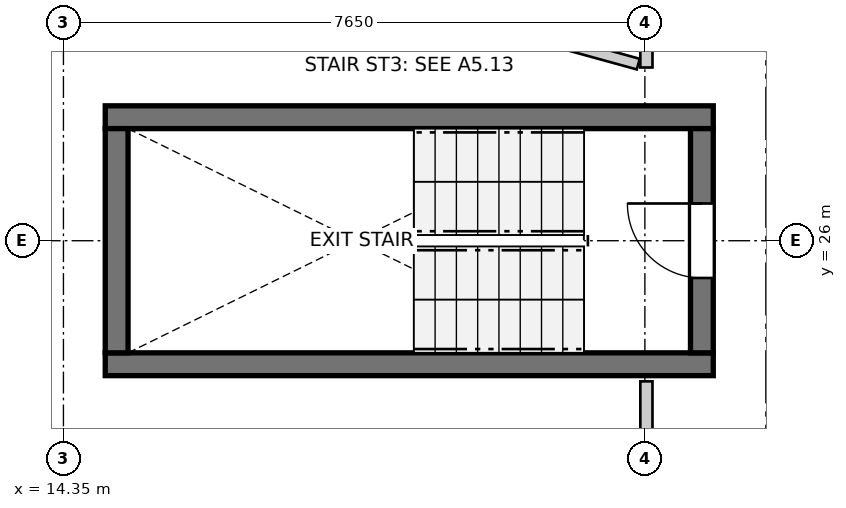
"""IFC4 building model, lengths in metres.
Left out: names, types, materials, properties, quantities, classifications, styles, units other than length and angle.
Written with IfcOpenShell. Run it as: python <this file> out.ifc"""

import sys

from ifc_helpers import new_model, si_unit, direction, frame, frame_2d, origin, place, context, subcontext, project, spatial, rectangle, extrude, source, transform, mapped, element, fill, save


model = new_model("IFC4")
c1 = context("Model", 3, precision=1e-05, world=origin(), true_north=direction((0.0, 1.0)))
c2 = subcontext(c1, "Body", "Model", "MODEL_VIEW")
j1 = project(units=[si_unit("LENGTHUNIT", "METRE"), si_unit("PLANEANGLEUNIT", "RADIAN")], contexts=[c1])
p1 = place(None, origin())
s1 = spatial("IfcSite", under=j1, at=p1, CompositionType="ELEMENT")
p2 = place(p1, origin())
s2 = spatial("IfcBuilding", under=s1, at=p2, CompositionType="ELEMENT")
p3 = place(p2, frame((0.0, 0.0, 46.2)))
s3 = spatial("IfcBuildingStorey", under=s2, at=p3, CompositionType="ELEMENT", Elevation=46.2)
for number, where, z_axis, x_axis in (
    (1, (14.9, 24.375, 0.0), (0.0, 0.0, 1.0), (1.0, 0.0, 0.0)),
    (2, (22.9, 27.625, 0.0), (0.0, 0.0, 1.0), (-1.0, 0.0, 0.0)),
):
    element("IfcWall", number, at=place(p3, frame(where, z_axis=z_axis, x_axis=x_axis)), inside=s3, PredefinedType="SHEAR", context=c2, shape_type="SweptSolid", body=[
        extrude(rectangle(XDim=8.0, YDim=0.3, at=frame_2d((4.0, 0.0))), origin(), (0.0, 0.0, 1.0), 2.94),
    ])
p4 = place(p3, frame((15.05, 27.475, 0.0), z_axis=(0.0, 0.0, 1.0), x_axis=(0.0, -1.0, 0.0)))
e3 = element("IfcWall", 3, at=p4, inside=s3, PredefinedType="SHEAR", context=c2, shape_type="SweptSolid", body=[
    extrude(rectangle(XDim=2.95, YDim=0.3, at=frame_2d((1.475, 0.0))), origin(), (0.0, 0.0, 1.0), 2.94),
])
p5 = place(p3, frame((22.75, 24.525, 0.0), z_axis=(0.0, 0.0, 1.0), x_axis=(0.0, 1.0, 0.0)))
e4 = element("IfcWall", 4, at=p5, inside=s3, PredefinedType="SHEAR", context=c2, shape_type="SweptSolid", body=[
    extrude(rectangle(XDim=2.95, YDim=0.3, at=frame_2d((1.475, 0.0))), origin(), (0.0, 0.0, 1.0), 2.94),
])
p6 = place(p5, frame((0.985, 0.0, 0.0)))
e5 = element("IfcOpeningElement", 5, at=p6, cuts=e4, PredefinedType="OPENING", context=c2, shape_type="SweptSolid", body=[
    extrude(rectangle(XDim=0.98, YDim=2.15, at=frame_2d((0.49, 1.075))), frame((0.0, 0.16, 0.0), z_axis=(0.0, -1.0, 0.0), x_axis=(1.0, 0.0, 0.0)), (0.0, 0.0, 1.0), 0.32),
])
p7 = place(p3, frame((22.02, 28.279, 0.0), z_axis=(0.0, 0.0, 1.0), x_axis=(0.0, 1.0, 0.0)))
e6 = element("IfcWall", 6, at=p7, inside=s3, PredefinedType="PARTITIONING", context=c2, shape_type="SweptSolid", body=[
    extrude(rectangle(XDim=3.173, YDim=0.16, at=frame_2d((1.586, 0.0))), origin(), (0.0, 0.0, 1.0), 2.94),
])
p8 = place(p7, frame((1.105, 0.0, 0.0)))
e7 = element("IfcOpeningElement", 7, at=p8, cuts=e6, PredefinedType="OPENING", context=c2, shape_type="SweptSolid", body=[
    extrude(rectangle(XDim=0.96, YDim=2.1, at=frame_2d((0.48, 1.05))), frame((0.0, 0.09, 0.0), z_axis=(0.0, -1.0, 0.0), x_axis=(1.0, 0.0, 0.0)), (0.0, 0.0, 1.0), 0.18),
])
p9 = place(p3, frame((22.02, 21.221, 0.0), z_axis=(0.0, 0.0, 1.0), x_axis=(0.0, 1.0, 0.0)))
e8 = element("IfcWall", 8, at=p9, inside=s3, PredefinedType="PARTITIONING", context=c2, shape_type="SweptSolid", body=[
    extrude(rectangle(XDim=2.929, YDim=0.16, at=frame_2d((1.464, 0.0))), origin(), (0.0, 0.0, 1.0), 2.94),
])
p10 = place(p9, frame((0.645, 0.0, 0.0)))
e9 = element("IfcOpeningElement", 9, at=p10, cuts=e8, PredefinedType="OPENING", context=c2, shape_type="SweptSolid", body=[
    extrude(rectangle(XDim=1.3, YDim=2.1, at=frame_2d((0.65, 1.05))), frame((0.0, 0.09, 0.0), z_axis=(0.0, -1.0, 0.0), x_axis=(1.0, 0.0, 0.0)), (0.0, 0.0, 1.0), 0.18),
])
p11 = place(p3, frame((7.668, 32.248, 0.0), z_axis=(0.0, 0.0, 1.0), x_axis=(0.964084579717, -0.265595412521, 0.0)))
e10 = element("IfcWall", 10, at=p11, inside=s3, PredefinedType="PARTITIONING", context=c2, shape_type="SweptSolid", body=[
    extrude(rectangle(XDim=14.776, YDim=0.145, at=frame_2d((7.388, 0.0))), origin(), (0.0, 0.0, 1.0), 2.94),
])
m1 = source(origin(), c2, "Body", "SweptSolid", [
    extrude(rectangle(XDim=0.98, YDim=2.15, at=frame_2d((0.49, 1.075))), frame((0.0, 0.025, 0.0), z_axis=(0.0, -1.0, 0.0), x_axis=(1.0, 0.0, 0.0)), (0.0, 0.0, 1.0), 0.05),
])
p12 = place(p6, origin())
e11 = element("IfcDoor", 11, at=p12, inside=s3, OperationType="SINGLE_SWING_RIGHT", PredefinedType="DOOR", context=c2, shape_type="MappedRepresentation", body=[
    mapped(m1, transform((0.0, 0.0, 0.0), x_axis=(1.0, 0.0, 0.0), y_axis=(0.0, 1.0, 0.0), z_axis=(0.0, 0.0, 1.0), scale=1.0)),
])
fill(e5, e11)
save(model, sys.argv[1])
